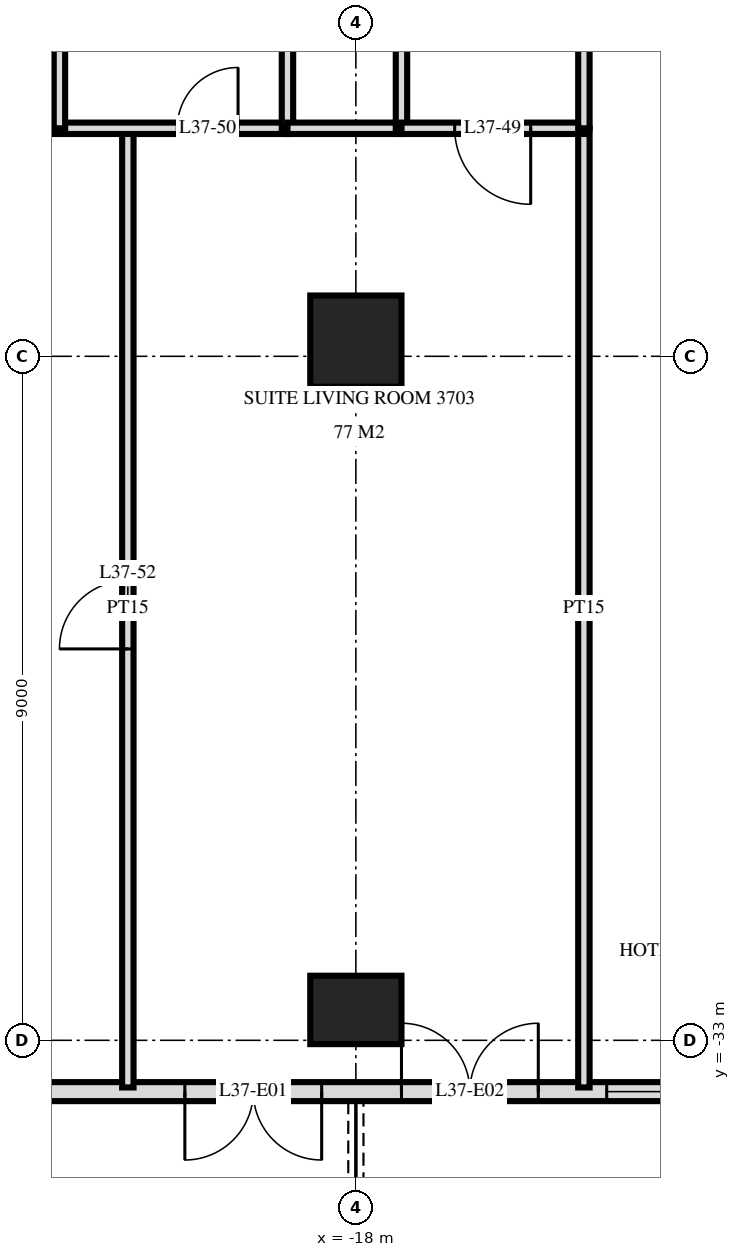
"""IFC4 building model, lengths in metres.
Left out: names, types, materials, properties, quantities, classifications, styles, units other than length and angle.
Written with IfcOpenShell. Run it as: python <this file> out.ifc"""

import sys

from ifc_helpers import new_model, si_unit, direction, frame, frame_2d, origin, origin_2d, place, context, subcontext, project, spatial, rectangle, extrude, element, fill, save


model = new_model("IFC4")
c1 = context("Model", 3, precision=1e-05, world=origin(), true_north=direction((0.0, 1.0)))
c2 = subcontext(c1, "Body", "Model", "MODEL_VIEW")
j1 = project(units=[si_unit("LENGTHUNIT", "METRE"), si_unit("PLANEANGLEUNIT", "RADIAN")], contexts=[c1])
p1 = place(None, origin())
s1 = spatial("IfcSite", under=j1, at=p1, CompositionType="ELEMENT")
p2 = place(p1, origin())
s2 = spatial("IfcBuilding", under=s1, at=p2, CompositionType="ELEMENT")
p3 = place(p2, frame((0.0, 0.0, 145.2)))
s3 = spatial("IfcBuildingStorey", under=s2, at=p3, CompositionType="ELEMENT", Elevation=145.2)
p4 = place(p3, frame((-18.0, -32.6, 0.0), z_axis=(0.0, 0.0, 1.0), x_axis=(1.0, 0.0, 0.0)))
e1 = element("IfcColumn", 1, at=p4, inside=s3, PredefinedType="COLUMN", context=c2, shape_type="SweptSolid", body=[
    extrude(rectangle(XDim=1.2, YDim=0.9, at=origin_2d()), origin(), (0.0, 0.0, 1.0), 3.6),
])
p5 = place(p3, frame((-18.0, -23.8, 0.0), z_axis=(0.0, 0.0, 1.0), x_axis=(1.0, 0.0, 0.0)))
e2 = element("IfcColumn", 2, at=p5, inside=s3, PredefinedType="COLUMN", context=c2, shape_type="SweptSolid", body=[
    extrude(rectangle(XDim=1.2, YDim=1.2, at=origin_2d()), origin(), (0.0, 0.0, 1.0), 3.6),
])
p6 = place(p3, frame((-23.675, -33.675, 0.0), z_axis=(0.0, 0.0, 1.0), x_axis=(1.0, 0.0, 0.0)))
e3 = element("IfcWall", 3, at=p6, inside=s3, PredefinedType="SOLIDWALL", context=c2, shape_type="SweptSolid", body=[
    extrude(rectangle(XDim=47.351, YDim=0.25, at=frame_2d((23.675, 0.0))), origin(), (0.0, 0.0, 1.0), 3.32),
])
p7 = place(p6, frame((3.425, 0.0, 0.0)))
e4 = element("IfcOpeningElement", 4, at=p7, cuts=e3, PredefinedType="OPENING", context=c2, shape_type="SweptSolid", body=[
    extrude(rectangle(XDim=1.8, YDim=2.4, at=frame_2d((0.9, 1.2))), frame((0.0, 0.135, 0.0), z_axis=(0.0, -1.0, 0.0), x_axis=(1.0, 0.0, 0.0)), (0.0, 0.0, 1.0), 0.27),
])
p8 = place(p6, frame((6.275, 0.0, 0.0)))
e5 = element("IfcOpeningElement", 5, at=p8, cuts=e3, PredefinedType="OPENING", context=c2, shape_type="SweptSolid", body=[
    extrude(rectangle(XDim=1.8, YDim=2.4, at=frame_2d((0.9, 1.2))), frame((0.0, 0.135, 0.0), z_axis=(0.0, -1.0, 0.0), x_axis=(1.0, 0.0, 0.0)), (0.0, 0.0, 1.0), 0.27),
])
p9 = place(p6, frame((8.975, 0.0, 0.3)))
e6 = element("IfcOpeningElement", 6, at=p9, cuts=e3, PredefinedType="OPENING", context=c2, shape_type="SweptSolid", body=[
    extrude(rectangle(XDim=2.4, YDim=2.1, at=frame_2d((1.2, 1.05))), frame((0.0, 0.135, 0.0), z_axis=(0.0, -1.0, 0.0), x_axis=(1.0, 0.0, 0.0)), (0.0, 0.0, 1.0), 0.27),
])
p10 = place(p6, frame((12.275, 0.0, 0.0)))
e7 = element("IfcOpeningElement", 7, at=p10, cuts=e3, PredefinedType="OPENING", context=c2, shape_type="SweptSolid", body=[
    extrude(rectangle(XDim=1.8, YDim=2.4, at=frame_2d((0.9, 1.2))), frame((0.0, 0.135, 0.0), z_axis=(0.0, -1.0, 0.0), x_axis=(1.0, 0.0, 0.0)), (0.0, 0.0, 1.0), 0.27),
])
p11 = place(p6, frame((14.975, 0.0, 0.3)))
e8 = element("IfcOpeningElement", 8, at=p11, cuts=e3, PredefinedType="OPENING", context=c2, shape_type="SweptSolid", body=[
    extrude(rectangle(XDim=2.4, YDim=2.1, at=frame_2d((1.2, 1.05))), frame((0.0, 0.135, 0.0), z_axis=(0.0, -1.0, 0.0), x_axis=(1.0, 0.0, 0.0)), (0.0, 0.0, 1.0), 0.27),
])
p12 = place(p6, frame((21.275, 0.0, 0.0)))
e9 = element("IfcOpeningElement", 9, at=p12, cuts=e3, PredefinedType="OPENING", context=c2, shape_type="SweptSolid", body=[
    extrude(rectangle(XDim=1.8, YDim=2.4, at=frame_2d((0.9, 1.2))), frame((0.0, 0.135, 0.0), z_axis=(0.0, -1.0, 0.0), x_axis=(1.0, 0.0, 0.0)), (0.0, 0.0, 1.0), 0.27),
])
p13 = place(p6, frame((24.275, 0.0, 0.0)))
e10 = element("IfcOpeningElement", 10, at=p13, cuts=e3, PredefinedType="OPENING", context=c2, shape_type="SweptSolid", body=[
    extrude(rectangle(XDim=1.8, YDim=2.4, at=frame_2d((0.9, 1.2))), frame((0.0, 0.135, 0.0), z_axis=(0.0, -1.0, 0.0), x_axis=(1.0, 0.0, 0.0)), (0.0, 0.0, 1.0), 0.27),
])
p14 = place(p6, frame((30.275, 0.0, 0.0)))
e11 = element("IfcOpeningElement", 11, at=p14, cuts=e3, PredefinedType="OPENING", context=c2, shape_type="SweptSolid", body=[
    extrude(rectangle(XDim=1.8, YDim=2.4, at=frame_2d((0.9, 1.2))), frame((0.0, 0.135, 0.0), z_axis=(0.0, -1.0, 0.0), x_axis=(1.0, 0.0, 0.0)), (0.0, 0.0, 1.0), 0.27),
])
p15 = place(p6, frame((32.975, 0.0, 0.3)))
e12 = element("IfcOpeningElement", 12, at=p15, cuts=e3, PredefinedType="OPENING", context=c2, shape_type="SweptSolid", body=[
    extrude(rectangle(XDim=2.4, YDim=2.1, at=frame_2d((1.2, 1.05))), frame((0.0, 0.135, 0.0), z_axis=(0.0, -1.0, 0.0), x_axis=(1.0, 0.0, 0.0)), (0.0, 0.0, 1.0), 0.27),
])
p16 = place(p6, frame((36.275, 0.0, 0.0)))
e13 = element("IfcOpeningElement", 13, at=p16, cuts=e3, PredefinedType="OPENING", context=c2, shape_type="SweptSolid", body=[
    extrude(rectangle(XDim=1.8, YDim=2.4, at=frame_2d((0.9, 1.2))), frame((0.0, 0.135, 0.0), z_axis=(0.0, -1.0, 0.0), x_axis=(1.0, 0.0, 0.0)), (0.0, 0.0, 1.0), 0.27),
])
p17 = place(p6, frame((38.975, 0.0, 0.3)))
e14 = element("IfcOpeningElement", 14, at=p17, cuts=e3, PredefinedType="OPENING", context=c2, shape_type="SweptSolid", body=[
    extrude(rectangle(XDim=2.4, YDim=2.1, at=frame_2d((1.2, 1.05))), frame((0.0, 0.135, 0.0), z_axis=(0.0, -1.0, 0.0), x_axis=(1.0, 0.0, 0.0)), (0.0, 0.0, 1.0), 0.27),
])
p18 = place(p6, frame((42.275, 0.0, 0.0)))
e15 = element("IfcOpeningElement", 15, at=p18, cuts=e3, PredefinedType="OPENING", context=c2, shape_type="SweptSolid", body=[
    extrude(rectangle(XDim=1.8, YDim=2.4, at=frame_2d((0.9, 1.2))), frame((0.0, 0.135, 0.0), z_axis=(0.0, -1.0, 0.0), x_axis=(1.0, 0.0, 0.0)), (0.0, 0.0, 1.0), 0.27),
])
p19 = place(p6, frame((45.125, 0.0, 0.3)))
e16 = element("IfcOpeningElement", 16, at=p19, cuts=e3, PredefinedType="OPENING", context=c2, shape_type="SweptSolid", body=[
    extrude(rectangle(XDim=1.8, YDim=2.1, at=frame_2d((0.9, 1.05))), frame((0.0, 0.135, 0.0), z_axis=(0.0, -1.0, 0.0), x_axis=(1.0, 0.0, 0.0)), (0.0, 0.0, 1.0), 0.27),
])
p20 = place(p3, frame((-15.0, -21.0, 0.0), z_axis=(0.0, 0.0, 1.0), x_axis=(0.0, 1.0, 0.0)))
e17 = element("IfcWall", 17, at=p20, inside=s3, PredefinedType="PARTITIONING", context=c2, shape_type="SweptSolid", body=[
    extrude(rectangle(XDim=4.2, YDim=0.15, at=frame_2d((2.1, 0.0))), origin(), (0.0, 0.0, 1.0), 3.32),
])
p21 = place(p3, frame((-15.0, -33.62, 0.0), z_axis=(0.0, 0.0, 1.0), x_axis=(0.0, 1.0, 0.0)))
e18 = element("IfcWall", 18, at=p21, inside=s3, PredefinedType="PARTITIONING", context=c2, shape_type="SweptSolid", body=[
    extrude(rectangle(XDim=12.62, YDim=0.15, at=frame_2d((6.31, 0.0))), origin(), (0.0, 0.0, 1.0), 3.32),
])
p22 = place(p3, frame((-17.4, -21.0, 0.0), z_axis=(0.0, 0.0, 1.0), x_axis=(0.0, 1.0, 0.0)))
e19 = element("IfcWall", 19, at=p22, inside=s3, PredefinedType="PARTITIONING", context=c2, shape_type="SweptSolid", body=[
    extrude(rectangle(XDim=4.2, YDim=0.15, at=frame_2d((2.1, 0.0))), origin(), (0.0, 0.0, 1.0), 3.32),
])
p23 = place(p22, frame((1.6, 0.0, 0.0)))
e20 = element("IfcOpeningElement", 20, at=p23, cuts=e19, PredefinedType="OPENING", context=c2, shape_type="SweptSolid", body=[
    extrude(rectangle(XDim=1.0, YDim=2.1, at=frame_2d((0.5, 1.05))), frame((0.0, 0.085, 0.0), z_axis=(0.0, -1.0, 0.0), x_axis=(1.0, 0.0, 0.0)), (0.0, 0.0, 1.0), 0.17),
])
p24 = place(p3, frame((-18.9, -21.0, 0.0), z_axis=(0.0, 0.0, 1.0), x_axis=(0.0, 1.0, 0.0)))
e21 = element("IfcWall", 21, at=p24, inside=s3, PredefinedType="PLUMBINGWALL", context=c2, shape_type="SweptSolid", body=[
    extrude(rectangle(XDim=4.2, YDim=0.15, at=frame_2d((2.1, 0.0))), origin(), (0.0, 0.0, 1.0), 3.32),
])
p25 = place(p3, frame((-21.0, -33.62, 0.0), z_axis=(0.0, 0.0, 1.0), x_axis=(0.0, 1.0, 0.0)))
e22 = element("IfcWall", 22, at=p25, inside=s3, PredefinedType="PARTITIONING", context=c2, shape_type="SweptSolid", body=[
    extrude(rectangle(XDim=12.62, YDim=0.15, at=frame_2d((6.31, 0.0))), origin(), (0.0, 0.0, 1.0), 3.32),
])
p26 = place(p25, frame((5.77, 0.0, 0.0)))
e23 = element("IfcOpeningElement", 23, at=p26, cuts=e22, PredefinedType="OPENING", context=c2, shape_type="SweptSolid", body=[
    extrude(rectangle(XDim=0.9, YDim=2.1, at=frame_2d((0.45, 1.05))), frame((0.0, 0.085, 0.0), z_axis=(0.0, -1.0, 0.0), x_axis=(1.0, 0.0, 0.0)), (0.0, 0.0, 1.0), 0.17),
])
p27 = place(p3, frame((-21.9, -21.0, 0.0), z_axis=(0.0, 0.0, 1.0), x_axis=(0.0, 1.0, 0.0)))
e24 = element("IfcWall", 24, at=p27, inside=s3, PredefinedType="PARTITIONING", context=c2, shape_type="SweptSolid", body=[
    extrude(rectangle(XDim=4.2, YDim=0.15, at=frame_2d((2.1, 0.0))), origin(), (0.0, 0.0, 1.0), 3.32),
])
p28 = place(p3, frame((-17.4, -21.0, 0.0), z_axis=(0.0, 0.0, 1.0), x_axis=(1.0, 0.0, 0.0)))
e25 = element("IfcWall", 25, at=p28, inside=s3, PredefinedType="PARTITIONING", context=c2, shape_type="SweptSolid", body=[
    extrude(rectangle(XDim=2.4, YDim=0.15, at=frame_2d((1.2, 0.0))), origin(), (0.0, 0.0, 1.0), 3.32),
])
p29 = place(p28, frame((0.7, 0.0, 0.0)))
e26 = element("IfcOpeningElement", 26, at=p29, cuts=e25, PredefinedType="OPENING", context=c2, shape_type="SweptSolid", body=[
    extrude(rectangle(XDim=1.0, YDim=2.1, at=frame_2d((0.5, 1.05))), frame((0.0, 0.085, 0.0), z_axis=(0.0, -1.0, 0.0), x_axis=(1.0, 0.0, 0.0)), (0.0, 0.0, 1.0), 0.17),
])
p30 = place(p3, frame((-28.02, -21.0, 0.0), z_axis=(0.0, 0.0, 1.0), x_axis=(1.0, 0.0, 0.0)))
e27 = element("IfcWall", 27, at=p30, inside=s3, PredefinedType="PARTITIONING", context=c2, shape_type="SweptSolid", body=[
    extrude(rectangle(XDim=9.12, YDim=0.15, at=frame_2d((4.56, 0.0))), origin(), (0.0, 0.0, 1.0), 3.32),
])
p31 = place(p30, frame((7.67, 0.0, 0.0)))
e28 = element("IfcOpeningElement", 28, at=p31, cuts=e27, PredefinedType="OPENING", context=c2, shape_type="SweptSolid", body=[
    extrude(rectangle(XDim=0.8, YDim=2.1, at=frame_2d((0.4, 1.05))), frame((0.0, 0.085, 0.0), z_axis=(0.0, -1.0, 0.0), x_axis=(1.0, 0.0, 0.0)), (0.0, 0.0, 1.0), 0.17),
])
p32 = place(p30, frame((2.52, 0.0, 0.0)))
e29 = element("IfcOpeningElement", 29, at=p32, cuts=e27, PredefinedType="OPENING", context=c2, shape_type="SweptSolid", body=[
    extrude(rectangle(XDim=0.9, YDim=2.1, at=frame_2d((0.45, 1.05))), frame((0.0, 0.085, 0.0), z_axis=(0.0, -1.0, 0.0), x_axis=(1.0, 0.0, 0.0)), (0.0, 0.0, 1.0), 0.17),
])
p33 = place(p3, frame((-18.9, -21.0, 0.0), z_axis=(0.0, 0.0, 1.0), x_axis=(1.0, 0.0, 0.0)))
e30 = element("IfcWall", 30, at=p33, inside=s3, PredefinedType="PLUMBINGWALL", context=c2, shape_type="SweptSolid", body=[
    extrude(rectangle(XDim=1.5, YDim=0.15, at=frame_2d((0.75, 0.0))), origin(), (0.0, 0.0, 1.0), 3.32),
])
p34 = place(p7, frame((0.9, 0.0, 0.0), z_axis=(0.0, 0.0, 1.0), x_axis=(-1.0, 0.0, 0.0)))
e31 = element("IfcDoor", 31, at=p34, inside=s3, OperationType="DOUBLE_DOOR_SINGLE_SWING", PredefinedType="DOOR", context=c2, shape_type="SweptSolid", body=[
    extrude(rectangle(XDim=1.8, YDim=2.4, at=frame_2d((0.0, 1.2))), frame((0.0, -0.025, 0.0), z_axis=(0.0, 1.0, 0.0), x_axis=(-1.0, 0.0, 0.0)), (0.0, 0.0, 1.0), 0.05),
])
fill(e4, e31)
p35 = place(p8, origin())
e32 = element("IfcDoor", 32, at=p35, inside=s3, OperationType="DOUBLE_DOOR_SINGLE_SWING", PredefinedType="DOOR", context=c2, shape_type="SweptSolid", body=[
    extrude(rectangle(XDim=1.8, YDim=2.4, at=frame_2d((0.9, 1.2))), frame((0.0, 0.025, 0.0), z_axis=(0.0, -1.0, 0.0), x_axis=(1.0, 0.0, 0.0)), (0.0, 0.0, 1.0), 0.05),
])
fill(e5, e32)
p36 = place(p9, origin())
e33 = element("IfcWindow", 33, at=p36, inside=s3, PartitioningType="SINGLE_PANEL", PredefinedType="WINDOW", context=c2, shape_type="SweptSolid", body=[
    extrude(rectangle(XDim=2.4, YDim=2.1, at=frame_2d((1.2, 1.05))), frame((0.0, 0.03, 0.0), z_axis=(0.0, -1.0, 0.0), x_axis=(1.0, 0.0, 0.0)), (0.0, 0.0, 1.0), 0.06),
])
fill(e6, e33)
p37 = place(p29, frame((0.5, 0.0, 0.0), z_axis=(0.0, 0.0, 1.0), x_axis=(-1.0, 0.0, 0.0)))
e34 = element("IfcDoor", 34, at=p37, inside=s3, OperationType="SINGLE_SWING_RIGHT", PredefinedType="DOOR", context=c2, shape_type="SweptSolid", body=[
    extrude(rectangle(XDim=1.0, YDim=2.1, at=frame_2d((0.0, 1.05))), frame((0.0, -0.025, 0.0), z_axis=(0.0, 1.0, 0.0), x_axis=(-1.0, 0.0, 0.0)), (0.0, 0.0, 1.0), 0.05),
])
fill(e26, e34)
p38 = place(p31, origin())
e35 = element("IfcDoor", 35, at=p38, inside=s3, OperationType="SINGLE_SWING_LEFT", PredefinedType="DOOR", context=c2, shape_type="SweptSolid", body=[
    extrude(rectangle(XDim=0.8, YDim=2.1, at=frame_2d((0.4, 1.05))), frame((0.0, 0.025, 0.0), z_axis=(0.0, -1.0, 0.0), x_axis=(1.0, 0.0, 0.0)), (0.0, 0.0, 1.0), 0.05),
])
fill(e28, e35)
p39 = place(p26, origin())
e36 = element("IfcDoor", 36, at=p39, inside=s3, OperationType="SINGLE_SWING_RIGHT", PredefinedType="DOOR", context=c2, shape_type="SweptSolid", body=[
    extrude(rectangle(XDim=0.9, YDim=2.1, at=frame_2d((0.45, 1.05))), frame((0.0, 0.025, 0.0), z_axis=(0.0, -1.0, 0.0), x_axis=(1.0, 0.0, 0.0)), (0.0, 0.0, 1.0), 0.05),
])
fill(e23, e36)
save(model, sys.argv[1])
